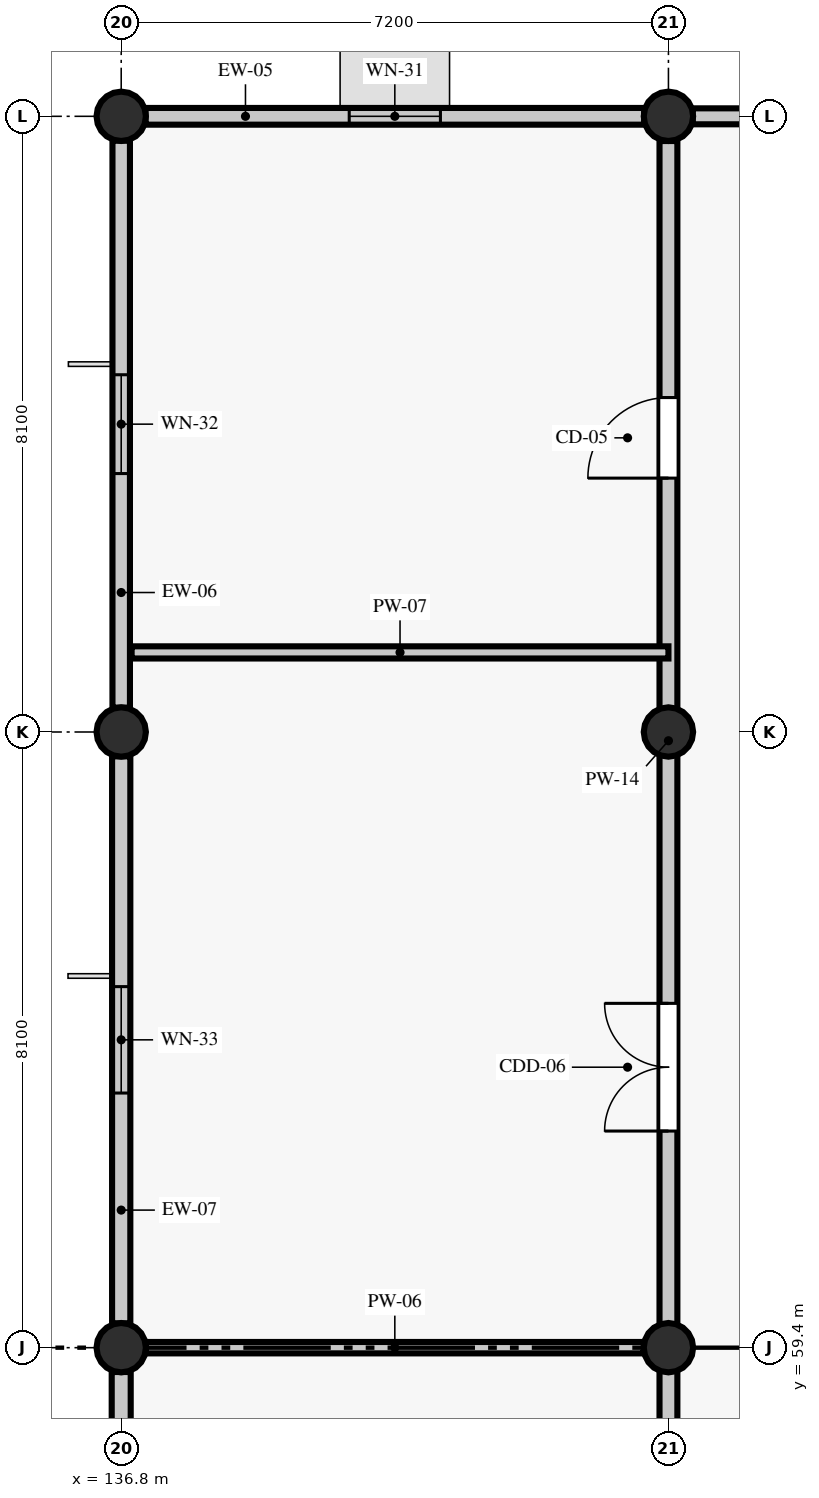
"""IFC4 building model, lengths in metres.
Left out: names, types, materials, properties, quantities, classifications, styles, units other than length and angle.
Written with IfcOpenShell. Run it as: python <this file> out.ifc"""

import sys

from ifc_helpers import new_model, si_unit, direction, frame, frame_2d, origin, origin_2d, place, context, subcontext, project, spatial, rectangle, circle, extrude, element, fill, save


model = new_model("IFC4")
c1 = context("Model", 3, precision=1e-05, world=origin(), true_north=direction((0.0, 1.0)))
c2 = subcontext(c1, "Body", "Model", "MODEL_VIEW")
j1 = project(units=[si_unit("LENGTHUNIT", "METRE"), si_unit("PLANEANGLEUNIT", "RADIAN")], contexts=[c1])
p1 = place(None, origin())
s1 = spatial("IfcSite", under=j1, at=p1, CompositionType="ELEMENT")
p2 = place(p1, origin())
s2 = spatial("IfcBuilding", under=s1, at=p2, CompositionType="ELEMENT")
p3 = place(p2, origin())
s3 = spatial("IfcBuildingStorey", under=s2, at=p3, CompositionType="ELEMENT", Elevation=0.0)
for number, where, z_axis, x_axis in (
    (1, (136.8, 59.4, 0.0), (0.0, 0.0, 1.0), (1.0, 0.0, 0.0)),
    (2, (136.8, 67.5, 0.0), (0.0, 0.0, 1.0), (1.0, 0.0, 0.0)),
    (3, (136.8, 75.6, 0.0), (0.0, 0.0, 1.0), (1.0, 0.0, 0.0)),
    (4, (144.0, 59.4, 0.0), (0.0, 0.0, 1.0), (1.0, 0.0, 0.0)),
    (5, (144.0, 67.5, 0.0), (0.0, 0.0, 1.0), (1.0, 0.0, 0.0)),
    (6, (144.0, 75.6, 0.0), (0.0, 0.0, 1.0), (1.0, 0.0, 0.0)),
):
    element("IfcColumn", number, at=place(p3, frame(where, z_axis=z_axis, x_axis=x_axis)), inside=s3, PredefinedType="COLUMN", context=c2, shape_type="SweptSolid", body=[
        extrude(circle(Radius=0.325, at=origin_2d()), origin(), (0.0, 0.0, 1.0), 4.565),
    ])
p4 = place(p3, frame((150.88, 75.6, 0.0), z_axis=(0.0, 0.0, 1.0), x_axis=(-1.0, 0.0, 0.0)))
e7 = element("IfcWall", 7, at=p4, inside=s3, PredefinedType="STANDARD", context=c2, shape_type="SweptSolid", body=[
    extrude(rectangle(XDim=6.56, YDim=0.21, at=frame_2d((3.28, 0.0))), origin(), (0.0, 0.0, 1.0), 3.915),
])
p5 = place(p4, frame((2.105, 0.0, 0.9)))
e8 = element("IfcOpeningElement", 8, at=p5, cuts=e7, PredefinedType="OPENING", context=c2, shape_type="SweptSolid", body=[
    extrude(rectangle(XDim=2.35, YDim=1.54, at=frame_2d((1.175, 0.77))), frame((0.0, 0.115, 0.0), z_axis=(0.0, -1.0, 0.0), x_axis=(1.0, 0.0, 0.0)), (0.0, 0.0, 1.0), 0.23),
])
p6 = place(p3, frame((143.68, 75.6, 0.0), z_axis=(0.0, 0.0, 1.0), x_axis=(-1.0, 0.0, 0.0)))
e9 = element("IfcWall", 9, at=p6, inside=s3, PredefinedType="STANDARD", context=c2, shape_type="SweptSolid", body=[
    extrude(rectangle(XDim=6.56, YDim=0.22, at=frame_2d((3.28, 0.0))), origin(), (0.0, 0.0, 1.0), 3.915),
])
p7 = place(p6, frame((2.68, 0.0, 0.9)))
e10 = element("IfcOpeningElement", 10, at=p7, cuts=e9, PredefinedType="OPENING", context=c2, shape_type="SweptSolid", body=[
    extrude(rectangle(XDim=1.2, YDim=1.66, at=frame_2d((0.6, 0.83))), frame((0.0, 0.12, 0.0), z_axis=(0.0, -1.0, 0.0), x_axis=(1.0, 0.0, 0.0)), (0.0, 0.0, 1.0), 0.24),
])
p8 = place(p3, frame((136.8, 75.28, 0.0), z_axis=(0.0, 0.0, 1.0), x_axis=(0.0, -1.0, 0.0)))
e11 = element("IfcWall", 11, at=p8, inside=s3, PredefinedType="STANDARD", context=c2, shape_type="SweptSolid", body=[
    extrude(rectangle(XDim=7.46, YDim=0.23, at=frame_2d((3.73, 0.0))), origin(), (0.0, 0.0, 1.0), 3.915),
])
p9 = place(p8, frame((3.08, 0.0, 0.9)))
e12 = element("IfcOpeningElement", 12, at=p9, cuts=e11, PredefinedType="OPENING", context=c2, shape_type="SweptSolid", body=[
    extrude(rectangle(XDim=1.3, YDim=1.66, at=frame_2d((0.65, 0.83))), frame((0.0, 0.125, 0.0), z_axis=(0.0, -1.0, 0.0), x_axis=(1.0, 0.0, 0.0)), (0.0, 0.0, 1.0), 0.25),
])
p10 = place(p3, frame((136.8, 67.18, 0.0), z_axis=(0.0, 0.0, 1.0), x_axis=(0.0, -1.0, 0.0)))
e13 = element("IfcWall", 13, at=p10, inside=s3, PredefinedType="STANDARD", context=c2, shape_type="SweptSolid", body=[
    extrude(rectangle(XDim=7.46, YDim=0.24, at=frame_2d((3.73, 0.0))), origin(), (0.0, 0.0, 1.0), 3.915),
])
p11 = place(p10, frame((3.03, 0.0, 0.9)))
e14 = element("IfcOpeningElement", 14, at=p11, cuts=e13, PredefinedType="OPENING", context=c2, shape_type="SweptSolid", body=[
    extrude(rectangle(XDim=1.4, YDim=1.66, at=frame_2d((0.7, 0.83))), frame((0.0, 0.13, 0.0), z_axis=(0.0, -1.0, 0.0), x_axis=(1.0, 0.0, 0.0)), (0.0, 0.0, 1.0), 0.26),
])
p12 = place(p3, frame((136.8, 59.08, 0.0), z_axis=(0.0, 0.0, 1.0), x_axis=(0.0, -1.0, 0.0)))
e15 = element("IfcWall", 15, at=p12, inside=s3, PredefinedType="STANDARD", context=c2, shape_type="SweptSolid", body=[
    extrude(rectangle(XDim=7.46, YDim=0.25, at=frame_2d((3.73, 0.0))), origin(), (0.0, 0.0, 1.0), 3.915),
])
p13 = place(p12, frame((2.98, 0.0, 0.9)))
e16 = element("IfcOpeningElement", 16, at=p13, cuts=e15, PredefinedType="OPENING", context=c2, shape_type="SweptSolid", body=[
    extrude(rectangle(XDim=1.5, YDim=1.66, at=frame_2d((0.75, 0.83))), frame((0.0, 0.135, 0.0), z_axis=(0.0, -1.0, 0.0), x_axis=(1.0, 0.0, 0.0)), (0.0, 0.0, 1.0), 0.27),
])
p14 = place(p3, frame((144.0, 36.325, 0.0), z_axis=(0.0, 0.0, 1.0), x_axis=(0.0, 1.0, 0.0)))
e17 = element("IfcWall", 17, at=p14, inside=s3, PredefinedType="PARTITIONING", context=c2, shape_type="SweptSolid", body=[
    extrude(rectangle(XDim=38.95, YDim=0.235, at=frame_2d((19.475, 0.0))), origin(), (0.0, 0.0, 1.0), 4.115),
])
p15 = place(p14, frame((2.045, 0.0, 0.0)))
e18 = element("IfcOpeningElement", 18, at=p15, cuts=e17, PredefinedType="OPENING", context=c2, shape_type="SweptSolid", body=[
    extrude(rectangle(XDim=1.62, YDim=2.22, at=frame_2d((0.81, 1.11))), frame((0.0, 0.127, 0.0), z_axis=(0.0, -1.0, 0.0), x_axis=(1.0, 0.0, 0.0)), (0.0, 0.0, 1.0), 0.255),
])
p16 = place(p14, frame((10.45, 0.0, 0.0)))
e19 = element("IfcOpeningElement", 19, at=p16, cuts=e17, PredefinedType="OPENING", context=c2, shape_type="SweptSolid", body=[
    extrude(rectangle(XDim=0.9, YDim=2.08, at=frame_2d((0.45, 1.04))), frame((0.0, 0.127, 0.0), z_axis=(0.0, -1.0, 0.0), x_axis=(1.0, 0.0, 0.0)), (0.0, 0.0, 1.0), 0.255),
])
p17 = place(p14, frame((16.105, 0.0, 0.0)))
e20 = element("IfcOpeningElement", 20, at=p17, cuts=e17, PredefinedType="OPENING", context=c2, shape_type="SweptSolid", body=[
    extrude(rectangle(XDim=0.94, YDim=2.08, at=frame_2d((0.47, 1.04))), frame((0.0, 0.127, 0.0), z_axis=(0.0, -1.0, 0.0), x_axis=(1.0, 0.0, 0.0)), (0.0, 0.0, 1.0), 0.255),
])
p18 = place(p14, frame((18.8, 0.0, 0.0)))
e21 = element("IfcOpeningElement", 21, at=p18, cuts=e17, PredefinedType="OPENING", context=c2, shape_type="SweptSolid", body=[
    extrude(rectangle(XDim=0.9, YDim=2.08, at=frame_2d((0.45, 1.04))), frame((0.0, 0.127, 0.0), z_axis=(0.0, -1.0, 0.0), x_axis=(1.0, 0.0, 0.0)), (0.0, 0.0, 1.0), 0.255),
])
p19 = place(p14, frame((21.125, 0.0, 0.0)))
e22 = element("IfcOpeningElement", 22, at=p19, cuts=e17, PredefinedType="OPENING", context=c2, shape_type="SweptSolid", body=[
    extrude(rectangle(XDim=0.9, YDim=2.13, at=frame_2d((0.45, 1.065))), frame((0.0, 0.127, 0.0), z_axis=(0.0, -1.0, 0.0), x_axis=(1.0, 0.0, 0.0)), (0.0, 0.0, 1.0), 0.255),
])
p20 = place(p14, frame((25.925, 0.0, 0.0)))
e23 = element("IfcOpeningElement", 23, at=p20, cuts=e17, PredefinedType="OPENING", context=c2, shape_type="SweptSolid", body=[
    extrude(rectangle(XDim=1.68, YDim=2.24, at=frame_2d((0.84, 1.12))), frame((0.0, 0.127, 0.0), z_axis=(0.0, -1.0, 0.0), x_axis=(1.0, 0.0, 0.0)), (0.0, 0.0, 1.0), 0.255),
])
p21 = place(p14, frame((34.515, 0.0, 0.0)))
e24 = element("IfcOpeningElement", 24, at=p21, cuts=e17, PredefinedType="OPENING", context=c2, shape_type="SweptSolid", body=[
    extrude(rectangle(XDim=1.06, YDim=2.08, at=frame_2d((0.53, 1.04))), frame((0.0, 0.127, 0.0), z_axis=(0.0, -1.0, 0.0), x_axis=(1.0, 0.0, 0.0)), (0.0, 0.0, 1.0), 0.255),
])
p22 = place(p3, frame((137.125, 59.4, 0.0), z_axis=(0.0, 0.0, 1.0), x_axis=(1.0, 0.0, 0.0)))
e25 = element("IfcWall", 25, at=p22, inside=s3, PredefinedType="PARTITIONING", context=c2, shape_type="SweptSolid", body=[
    extrude(rectangle(XDim=6.55, YDim=0.15, at=frame_2d((3.275, 0.0))), origin(), (0.0, 0.0, 1.0), 3.865),
])
p23 = place(p3, frame((136.937, 68.547, 0.0), z_axis=(0.0, 0.0, 1.0), x_axis=(1.0, 0.0, 0.0)))
e26 = element("IfcWall", 26, at=p23, inside=s3, PredefinedType="PARTITIONING", context=c2, shape_type="SweptSolid", body=[
    extrude(rectangle(XDim=7.063, YDim=0.16, at=frame_2d((3.531, 0.0))), origin(), (0.0, 0.0, 1.0), 4.115),
])
p24 = place(p7, origin())
e27 = element("IfcWindow", 27, at=p24, inside=s3, PartitioningType="SINGLE_PANEL", PredefinedType="WINDOW", context=c2, shape_type="SweptSolid", body=[
    extrude(rectangle(XDim=1.2, YDim=1.66, at=frame_2d((0.6, 0.83))), frame((0.0, 0.03, 0.0), z_axis=(0.0, -1.0, 0.0), x_axis=(1.0, 0.0, 0.0)), (0.0, 0.0, 1.0), 0.06),
])
fill(e10, e27)
p25 = place(p9, origin())
e28 = element("IfcWindow", 28, at=p25, inside=s3, PartitioningType="SINGLE_PANEL", PredefinedType="WINDOW", context=c2, shape_type="SweptSolid", body=[
    extrude(rectangle(XDim=1.3, YDim=1.66, at=frame_2d((0.65, 0.83))), frame((0.0, 0.03, 0.0), z_axis=(0.0, -1.0, 0.0), x_axis=(1.0, 0.0, 0.0)), (0.0, 0.0, 1.0), 0.06),
])
fill(e12, e28)
p26 = place(p11, origin())
e29 = element("IfcWindow", 29, at=p26, inside=s3, PartitioningType="SINGLE_PANEL", PredefinedType="WINDOW", context=c2, shape_type="SweptSolid", body=[
    extrude(rectangle(XDim=1.4, YDim=1.66, at=frame_2d((0.7, 0.83))), frame((0.0, 0.03, 0.0), z_axis=(0.0, -1.0, 0.0), x_axis=(1.0, 0.0, 0.0)), (0.0, 0.0, 1.0), 0.06),
])
fill(e14, e29)
p27 = place(p20, origin())
e30 = element("IfcDoor", 30, at=p27, inside=s3, OperationType="DOUBLE_DOOR_SINGLE_SWING", PredefinedType="DOOR", context=c2, shape_type="SweptSolid", body=[
    extrude(rectangle(XDim=1.68, YDim=2.24, at=frame_2d((0.84, 1.12))), frame((0.0, 0.025, 0.0), z_axis=(0.0, -1.0, 0.0), x_axis=(1.0, 0.0, 0.0)), (0.0, 0.0, 1.0), 0.05),
])
fill(e23, e30)
p28 = place(p21, origin())
e31 = element("IfcDoor", 31, at=p28, inside=s3, OperationType="SINGLE_SWING_LEFT", PredefinedType="DOOR", context=c2, shape_type="SweptSolid", body=[
    extrude(rectangle(XDim=1.06, YDim=2.08, at=frame_2d((0.53, 1.04))), frame((0.0, 0.025, 0.0), z_axis=(0.0, -1.0, 0.0), x_axis=(1.0, 0.0, 0.0)), (0.0, 0.0, 1.0), 0.05),
])
fill(e24, e31)
save(model, sys.argv[1])
